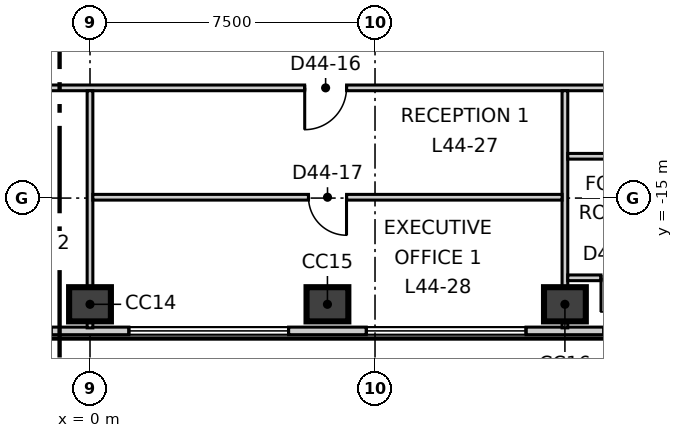
"""IFC4 building model, lengths in metres.
Left out: names, types, materials, properties, quantities, classifications, styles, units other than length and angle.
Written with IfcOpenShell. Run it as: python <this file> out.ifc"""

import sys

from ifc_helpers import new_model, si_unit, direction, frame, frame_2d, origin, origin_2d, place, context, subcontext, project, spatial, rectangle, extrude, element, fill, save


model = new_model("IFC4")
c1 = context("Model", 3, precision=1e-05, world=origin(), true_north=direction((0.0, 1.0)))
c2 = subcontext(c1, "Body", "Model", "MODEL_VIEW")
j1 = project(units=[si_unit("LENGTHUNIT", "METRE"), si_unit("PLANEANGLEUNIT", "RADIAN")], contexts=[c1])
p1 = place(None, origin())
s1 = spatial("IfcSite", under=j1, at=p1, CompositionType="ELEMENT")
p2 = place(p1, origin())
s2 = spatial("IfcBuilding", under=s1, at=p2, CompositionType="ELEMENT")
p3 = place(p2, frame((0.0, 0.0, 191.3)))
s3 = spatial("IfcBuildingStorey", under=s2, at=p3, CompositionType="ELEMENT", Elevation=191.3)
for number, where, z_axis, x_axis in (
    (1, (0.0, -17.795, -0.3), (0.0, 0.0, 1.0), (1.0, 0.0, 0.0)),
    (2, (6.248, -17.795, -0.3), (0.0, 0.0, 1.0), (1.0, 0.0, 0.0)),
    (3, (12.497, -17.795, -0.3), (0.0, 0.0, 1.0), (1.0, 0.0, 0.0)),
):
    element("IfcColumn", number, at=place(p3, frame(where, z_axis=z_axis, x_axis=x_axis)), inside=s3, PredefinedType="COLUMN", context=c2, shape_type="SweptSolid", body=[
        extrude(rectangle(XDim=1.1, YDim=0.9, at=origin_2d()), origin(), (0.0, 0.0, 1.0), 4.0),
    ])
p4 = place(p3, frame((-26.296, -18.495, 0.0), z_axis=(0.0, 0.0, 1.0), x_axis=(1.0, 0.0, 0.0)))
e4 = element("IfcWall", 4, at=p4, inside=s3, PredefinedType="ELEMENTEDWALL", context=c2, shape_type="SweptSolid", body=[
    extrude(rectangle(XDim=52.572, YDim=0.2, at=frame_2d((26.286, 0.0))), origin(), (0.0, 0.0, 1.0), 3.7),
])
p5 = place(p4, frame((2.327, 0.0, 0.9)))
e5 = element("IfcOpeningElement", 5, at=p5, cuts=e4, PredefinedType="OPENING", context=c2, shape_type="SweptSolid", body=[
    extrude(rectangle(XDim=4.2, YDim=2.5, at=frame_2d((2.1, 1.25))), frame((0.0, 0.11, 0.0), z_axis=(0.0, -1.0, 0.0), x_axis=(1.0, 0.0, 0.0)), (0.0, 0.0, 1.0), 0.22),
])
p6 = place(p4, frame((8.575, 0.0, 0.9)))
e6 = element("IfcOpeningElement", 6, at=p6, cuts=e4, PredefinedType="OPENING", context=c2, shape_type="SweptSolid", body=[
    extrude(rectangle(XDim=4.2, YDim=2.5, at=frame_2d((2.1, 1.25))), frame((0.0, 0.11, 0.0), z_axis=(0.0, -1.0, 0.0), x_axis=(1.0, 0.0, 0.0)), (0.0, 0.0, 1.0), 0.22),
])
p7 = place(p4, frame((14.824, 0.0, 0.9)))
e7 = element("IfcOpeningElement", 7, at=p7, cuts=e4, PredefinedType="OPENING", context=c2, shape_type="SweptSolid", body=[
    extrude(rectangle(XDim=4.2, YDim=2.5, at=frame_2d((2.1, 1.25))), frame((0.0, 0.11, 0.0), z_axis=(0.0, -1.0, 0.0), x_axis=(1.0, 0.0, 0.0)), (0.0, 0.0, 1.0), 0.22),
])
p8 = place(p4, frame((21.072, 0.0, 0.9)))
e8 = element("IfcOpeningElement", 8, at=p8, cuts=e4, PredefinedType="OPENING", context=c2, shape_type="SweptSolid", body=[
    extrude(rectangle(XDim=4.2, YDim=2.5, at=frame_2d((2.1, 1.25))), frame((0.0, 0.11, 0.0), z_axis=(0.0, -1.0, 0.0), x_axis=(1.0, 0.0, 0.0)), (0.0, 0.0, 1.0), 0.22),
])
p9 = place(p4, frame((27.32, 0.0, 0.9)))
e9 = element("IfcOpeningElement", 9, at=p9, cuts=e4, PredefinedType="OPENING", context=c2, shape_type="SweptSolid", body=[
    extrude(rectangle(XDim=4.2, YDim=2.5, at=frame_2d((2.1, 1.25))), frame((0.0, 0.11, 0.0), z_axis=(0.0, -1.0, 0.0), x_axis=(1.0, 0.0, 0.0)), (0.0, 0.0, 1.0), 0.22),
])
p10 = place(p4, frame((33.568, 0.0, 0.9)))
e10 = element("IfcOpeningElement", 10, at=p10, cuts=e4, PredefinedType="OPENING", context=c2, shape_type="SweptSolid", body=[
    extrude(rectangle(XDim=4.2, YDim=2.5, at=frame_2d((2.1, 1.25))), frame((0.0, 0.11, 0.0), z_axis=(0.0, -1.0, 0.0), x_axis=(1.0, 0.0, 0.0)), (0.0, 0.0, 1.0), 0.22),
])
p11 = place(p4, frame((39.817, 0.0, 0.9)))
e11 = element("IfcOpeningElement", 11, at=p11, cuts=e4, PredefinedType="OPENING", context=c2, shape_type="SweptSolid", body=[
    extrude(rectangle(XDim=4.2, YDim=2.5, at=frame_2d((2.1, 1.25))), frame((0.0, 0.11, 0.0), z_axis=(0.0, -1.0, 0.0), x_axis=(1.0, 0.0, 0.0)), (0.0, 0.0, 1.0), 0.22),
])
p12 = place(p4, frame((46.065, 0.0, 0.9)))
e12 = element("IfcOpeningElement", 12, at=p12, cuts=e4, PredefinedType="OPENING", context=c2, shape_type="SweptSolid", body=[
    extrude(rectangle(XDim=4.2, YDim=2.5, at=frame_2d((2.1, 1.25))), frame((0.0, 0.11, 0.0), z_axis=(0.0, -1.0, 0.0), x_axis=(1.0, 0.0, 0.0)), (0.0, 0.0, 1.0), 0.22),
])
p13 = place(p3, frame((29.165, -13.525, 0.0), z_axis=(0.0, 0.0, 1.0), x_axis=(-0.500008941164, 0.86602024154, 0.0)))
e13 = element("IfcWall", 13, at=p13, inside=s3, PredefinedType="ELEMENTEDWALL", context=c2, shape_type="SweptSolid", body=[
    extrude(rectangle(XDim=52.571, YDim=0.2, at=frame_2d((26.286, 0.0))), origin(), (0.0, 0.0, 1.0), 3.7),
])
p14 = place(p13, frame((2.327, 0.0, 0.9)))
e14 = element("IfcOpeningElement", 14, at=p14, cuts=e13, PredefinedType="OPENING", context=c2, shape_type="SweptSolid", body=[
    extrude(rectangle(XDim=4.2, YDim=2.5, at=frame_2d((2.1, 1.25))), frame((0.0, 0.11, 0.0), z_axis=(0.0, -1.0, 0.0), x_axis=(1.0, 0.0, 0.0)), (0.0, 0.0, 1.0), 0.22),
])
p15 = place(p13, frame((8.575, 0.0, 0.9)))
e15 = element("IfcOpeningElement", 15, at=p15, cuts=e13, PredefinedType="OPENING", context=c2, shape_type="SweptSolid", body=[
    extrude(rectangle(XDim=4.2, YDim=2.5, at=frame_2d((2.1, 1.25))), frame((0.0, 0.11, 0.0), z_axis=(0.0, -1.0, 0.0), x_axis=(1.0, 0.0, 0.0)), (0.0, 0.0, 1.0), 0.22),
])
p16 = place(p13, frame((14.823, 0.0, 0.9)))
e16 = element("IfcOpeningElement", 16, at=p16, cuts=e13, PredefinedType="OPENING", context=c2, shape_type="SweptSolid", body=[
    extrude(rectangle(XDim=4.2, YDim=2.5, at=frame_2d((2.1, 1.25))), frame((0.0, 0.11, 0.0), z_axis=(0.0, -1.0, 0.0), x_axis=(1.0, 0.0, 0.0)), (0.0, 0.0, 1.0), 0.22),
])
p17 = place(p13, frame((21.072, 0.0, 0.9)))
e17 = element("IfcOpeningElement", 17, at=p17, cuts=e13, PredefinedType="OPENING", context=c2, shape_type="SweptSolid", body=[
    extrude(rectangle(XDim=4.2, YDim=2.5, at=frame_2d((2.1, 1.25))), frame((0.0, 0.11, 0.0), z_axis=(0.0, -1.0, 0.0), x_axis=(1.0, 0.0, 0.0)), (0.0, 0.0, 1.0), 0.22),
])
p18 = place(p13, frame((27.32, 0.0, 0.9)))
e18 = element("IfcOpeningElement", 18, at=p18, cuts=e13, PredefinedType="OPENING", context=c2, shape_type="SweptSolid", body=[
    extrude(rectangle(XDim=4.2, YDim=2.5, at=frame_2d((2.1, 1.25))), frame((0.0, 0.11, 0.0), z_axis=(0.0, -1.0, 0.0), x_axis=(1.0, 0.0, 0.0)), (0.0, 0.0, 1.0), 0.22),
])
p19 = place(p13, frame((33.568, 0.0, 0.9)))
e19 = element("IfcOpeningElement", 19, at=p19, cuts=e13, PredefinedType="OPENING", context=c2, shape_type="SweptSolid", body=[
    extrude(rectangle(XDim=4.2, YDim=2.5, at=frame_2d((2.1, 1.25))), frame((0.0, 0.11, 0.0), z_axis=(0.0, -1.0, 0.0), x_axis=(1.0, 0.0, 0.0)), (0.0, 0.0, 1.0), 0.22),
])
p20 = place(p13, frame((39.816, 0.0, 0.9)))
e20 = element("IfcOpeningElement", 20, at=p20, cuts=e13, PredefinedType="OPENING", context=c2, shape_type="SweptSolid", body=[
    extrude(rectangle(XDim=4.2, YDim=2.5, at=frame_2d((2.1, 1.25))), frame((0.0, 0.11, 0.0), z_axis=(0.0, -1.0, 0.0), x_axis=(1.0, 0.0, 0.0)), (0.0, 0.0, 1.0), 0.22),
])
p21 = place(p13, frame((46.064, 0.0, 0.9)))
e21 = element("IfcOpeningElement", 21, at=p21, cuts=e13, PredefinedType="OPENING", context=c2, shape_type="SweptSolid", body=[
    extrude(rectangle(XDim=4.2, YDim=2.5, at=frame_2d((2.1, 1.25))), frame((0.0, 0.11, 0.0), z_axis=(0.0, -1.0, 0.0), x_axis=(1.0, 0.0, 0.0)), (0.0, 0.0, 1.0), 0.22),
])
p22 = place(p3, frame((-20.882, -11.969, 0.0), z_axis=(0.0, 0.0, 1.0), x_axis=(0.499998738735, 0.866026131975, 0.0)))
e22 = element("IfcWall", 22, at=p22, inside=s3, PredefinedType="PARTITIONING", context=c2, shape_type="SweptSolid", body=[
    extrude(rectangle(XDim=41.764, YDim=0.15, at=frame_2d((20.882, 0.0))), origin(), (0.0, 0.0, 1.0), 3.7),
])
p23 = place(p22, frame((37.014, 0.0, 0.0)))
e23 = element("IfcOpeningElement", 23, at=p23, cuts=e22, PredefinedType="OPENING", context=c2, shape_type="SweptSolid", body=[
    extrude(rectangle(XDim=1.0, YDim=2.1, at=frame_2d((0.5, 1.05))), frame((0.0, 0.085, 0.0), z_axis=(0.0, -1.0, 0.0), x_axis=(1.0, 0.0, 0.0)), (0.0, 0.0, 1.0), 0.17),
])
p24 = place(p22, frame((29.653, 0.0, 0.0)))
e24 = element("IfcOpeningElement", 24, at=p24, cuts=e22, PredefinedType="OPENING", context=c2, shape_type="SweptSolid", body=[
    extrude(rectangle(XDim=1.0, YDim=2.1, at=frame_2d((0.5, 1.05))), frame((0.0, 0.085, 0.0), z_axis=(0.0, -1.0, 0.0), x_axis=(1.0, 0.0, 0.0)), (0.0, 0.0, 1.0), 0.17),
])
p25 = place(p22, frame((23.405, 0.0, 0.0)))
e25 = element("IfcOpeningElement", 25, at=p25, cuts=e22, PredefinedType="OPENING", context=c2, shape_type="SweptSolid", body=[
    extrude(rectangle(XDim=1.0, YDim=2.1, at=frame_2d((0.5, 1.05))), frame((0.0, 0.085, 0.0), z_axis=(0.0, -1.0, 0.0), x_axis=(1.0, 0.0, 0.0)), (0.0, 0.0, 1.0), 0.17),
])
p26 = place(p22, frame((9.657, 0.0, 0.0)))
e26 = element("IfcOpeningElement", 26, at=p26, cuts=e22, PredefinedType="OPENING", context=c2, shape_type="SweptSolid", body=[
    extrude(rectangle(XDim=1.1, YDim=2.1, at=frame_2d((0.55, 1.05))), frame((0.0, 0.085, 0.0), z_axis=(0.0, -1.0, 0.0), x_axis=(1.0, 0.0, 0.0)), (0.0, 0.0, 1.0), 0.17),
])
p27 = place(p22, frame((18.757, 0.0, 0.0)))
e27 = element("IfcOpeningElement", 27, at=p27, cuts=e22, PredefinedType="OPENING", context=c2, shape_type="SweptSolid", body=[
    extrude(rectangle(XDim=0.9, YDim=2.1, at=frame_2d((0.45, 1.05))), frame((0.0, 0.085, 0.0), z_axis=(0.0, -1.0, 0.0), x_axis=(1.0, 0.0, 0.0)), (0.0, 0.0, 1.0), 0.17),
])
p28 = place(p22, frame((15.557, 0.0, 0.0)))
e28 = element("IfcOpeningElement", 28, at=p28, cuts=e22, PredefinedType="OPENING", context=c2, shape_type="SweptSolid", body=[
    extrude(rectangle(XDim=0.9, YDim=2.1, at=frame_2d((0.45, 1.05))), frame((0.0, 0.085, 0.0), z_axis=(0.0, -1.0, 0.0), x_axis=(1.0, 0.0, 0.0)), (0.0, 0.0, 1.0), 0.17),
])
p29 = place(p22, frame((12.657, 0.0, 0.0)))
e29 = element("IfcOpeningElement", 29, at=p29, cuts=e22, PredefinedType="OPENING", context=c2, shape_type="SweptSolid", body=[
    extrude(rectangle(XDim=1.0, YDim=2.1, at=frame_2d((0.5, 1.05))), frame((0.0, 0.085, 0.0), z_axis=(0.0, -1.0, 0.0), x_axis=(1.0, 0.0, 0.0)), (0.0, 0.0, 1.0), 0.17),
])
p30 = place(p22, frame((3.56, 0.0, 0.0)))
e30 = element("IfcOpeningElement", 30, at=p30, cuts=e22, PredefinedType="OPENING", context=c2, shape_type="SweptSolid", body=[
    extrude(rectangle(XDim=1.1, YDim=2.1, at=frame_2d((0.55, 1.05))), frame((0.0, 0.085, 0.0), z_axis=(0.0, -1.0, 0.0), x_axis=(1.0, 0.0, 0.0)), (0.0, 0.0, 1.0), 0.17),
])
p31 = place(p3, frame((-20.808, -12.1, 0.0), z_axis=(0.0, 0.0, 1.0), x_axis=(1.0, 0.0, 0.0)))
e31 = element("IfcWall", 31, at=p31, inside=s3, PredefinedType="PARTITIONING", context=c2, shape_type="SweptSolid", body=[
    extrude(rectangle(XDim=41.766, YDim=0.15, at=frame_2d((20.883, 0.0))), origin(), (0.0, 0.0, 1.0), 3.7),
])
p32 = place(p31, frame((3.5, 0.0, 0.0)))
e32 = element("IfcOpeningElement", 32, at=p32, cuts=e31, PredefinedType="OPENING", context=c2, shape_type="SweptSolid", body=[
    extrude(rectangle(XDim=1.1, YDim=2.1, at=frame_2d((0.55, 1.05))), frame((0.0, 0.085, 0.0), z_axis=(0.0, -1.0, 0.0), x_axis=(1.0, 0.0, 0.0)), (0.0, 0.0, 1.0), 0.17),
])
p33 = place(p31, frame((18.362, 0.0, 0.0)))
e33 = element("IfcOpeningElement", 33, at=p33, cuts=e31, PredefinedType="OPENING", context=c2, shape_type="SweptSolid", body=[
    extrude(rectangle(XDim=1.1, YDim=2.1, at=frame_2d((0.55, 1.05))), frame((0.0, 0.085, 0.0), z_axis=(0.0, -1.0, 0.0), x_axis=(1.0, 0.0, 0.0)), (0.0, 0.0, 1.0), 0.17),
])
p34 = place(p31, frame((9.462, 0.0, 0.0)))
e34 = element("IfcOpeningElement", 34, at=p34, cuts=e31, PredefinedType="OPENING", context=c2, shape_type="SweptSolid", body=[
    extrude(rectangle(XDim=0.9, YDim=2.1, at=frame_2d((0.45, 1.05))), frame((0.0, 0.085, 0.0), z_axis=(0.0, -1.0, 0.0), x_axis=(1.0, 0.0, 0.0)), (0.0, 0.0, 1.0), 0.17),
])
p35 = place(p31, frame((12.662, 0.0, 0.0)))
e35 = element("IfcOpeningElement", 35, at=p35, cuts=e31, PredefinedType="OPENING", context=c2, shape_type="SweptSolid", body=[
    extrude(rectangle(XDim=0.9, YDim=2.1, at=frame_2d((0.45, 1.05))), frame((0.0, 0.085, 0.0), z_axis=(0.0, -1.0, 0.0), x_axis=(1.0, 0.0, 0.0)), (0.0, 0.0, 1.0), 0.17),
])
p36 = place(p31, frame((15.362, 0.0, 0.0)))
e36 = element("IfcOpeningElement", 36, at=p36, cuts=e31, PredefinedType="OPENING", context=c2, shape_type="SweptSolid", body=[
    extrude(rectangle(XDim=1.0, YDim=2.1, at=frame_2d((0.5, 1.05))), frame((0.0, 0.085, 0.0), z_axis=(0.0, -1.0, 0.0), x_axis=(1.0, 0.0, 0.0)), (0.0, 0.0, 1.0), 0.17),
])
p37 = place(p31, frame((26.458, 0.0, 0.0)))
e37 = element("IfcOpeningElement", 37, at=p37, cuts=e31, PredefinedType="OPENING", context=c2, shape_type="SweptSolid", body=[
    extrude(rectangle(XDim=1.1, YDim=2.1, at=frame_2d((0.55, 1.05))), frame((0.0, 0.085, 0.0), z_axis=(0.0, -1.0, 0.0), x_axis=(1.0, 0.0, 0.0)), (0.0, 0.0, 1.0), 0.17),
])
p38 = place(p31, frame((36.955, 0.0, 0.0)))
e38 = element("IfcOpeningElement", 38, at=p38, cuts=e31, PredefinedType="OPENING", context=c2, shape_type="SweptSolid", body=[
    extrude(rectangle(XDim=1.1, YDim=2.1, at=frame_2d((0.55, 1.05))), frame((0.0, 0.085, 0.0), z_axis=(0.0, -1.0, 0.0), x_axis=(1.0, 0.0, 0.0)), (0.0, 0.0, 1.0), 0.17),
])
p39 = place(p3, frame((0.0, -18.415, 0.0), z_axis=(0.0, 0.0, 1.0), x_axis=(0.0, 1.0, 0.0)))
e39 = element("IfcWall", 39, at=p39, inside=s3, PredefinedType="PARTITIONING", context=c2, shape_type="SweptSolid", body=[
    extrude(rectangle(XDim=6.24, YDim=0.15, at=frame_2d((3.12, 0.0))), origin(), (0.0, 0.0, 1.0), 3.2),
])
p40 = place(p3, frame((0.075, 24.07, 0.0), z_axis=(0.0, 0.0, 1.0), x_axis=(0.49999939571, -0.866025752671, 0.0)))
e40 = element("IfcWall", 40, at=p40, inside=s3, PredefinedType="PARTITIONING", context=c2, shape_type="SweptSolid", body=[
    extrude(rectangle(XDim=41.614, YDim=0.15, at=frame_2d((20.807, 0.0))), origin(), (0.0, 0.0, 1.0), 3.7),
])
p41 = place(p40, frame((37.015, 0.0, 0.0)))
e41 = element("IfcOpeningElement", 41, at=p41, cuts=e40, PredefinedType="OPENING", context=c2, shape_type="SweptSolid", body=[
    extrude(rectangle(XDim=1.1, YDim=2.1, at=frame_2d((0.55, 1.05))), frame((0.0, 0.085, 0.0), z_axis=(0.0, -1.0, 0.0), x_axis=(1.0, 0.0, 0.0)), (0.0, 0.0, 1.0), 0.17),
])
p42 = place(p40, frame((25.154, 0.0, 0.0)))
e42 = element("IfcOpeningElement", 42, at=p42, cuts=e40, PredefinedType="OPENING", context=c2, shape_type="SweptSolid", body=[
    extrude(rectangle(XDim=1.0, YDim=2.1, at=frame_2d((0.5, 1.05))), frame((0.0, 0.085, 0.0), z_axis=(0.0, -1.0, 0.0), x_axis=(1.0, 0.0, 0.0)), (0.0, 0.0, 1.0), 0.17),
])
p43 = place(p40, frame((31.454, 0.0, 0.0)))
e43 = element("IfcOpeningElement", 43, at=p43, cuts=e40, PredefinedType="OPENING", context=c2, shape_type="SweptSolid", body=[
    extrude(rectangle(XDim=0.9, YDim=2.1, at=frame_2d((0.45, 1.05))), frame((0.0, 0.085, 0.0), z_axis=(0.0, -1.0, 0.0), x_axis=(1.0, 0.0, 0.0)), (0.0, 0.0, 1.0), 0.17),
])
p44 = place(p40, frame((17.157, 0.0, 0.0)))
e44 = element("IfcOpeningElement", 44, at=p44, cuts=e40, PredefinedType="OPENING", context=c2, shape_type="SweptSolid", body=[
    extrude(rectangle(XDim=1.0, YDim=2.1, at=frame_2d((0.5, 1.05))), frame((0.0, 0.085, 0.0), z_axis=(0.0, -1.0, 0.0), x_axis=(1.0, 0.0, 0.0)), (0.0, 0.0, 1.0), 0.17),
])
p45 = place(p40, frame((6.609, 0.0, 0.0)))
e45 = element("IfcOpeningElement", 45, at=p45, cuts=e40, PredefinedType="OPENING", context=c2, shape_type="SweptSolid", body=[
    extrude(rectangle(XDim=1.1, YDim=2.1, at=frame_2d((0.55, 1.05))), frame((0.0, 0.085, 0.0), z_axis=(0.0, -1.0, 0.0), x_axis=(1.0, 0.0, 0.0)), (0.0, 0.0, 1.0), 0.17),
])
p46 = place(p3, frame((12.497, -18.415, 0.0), z_axis=(0.0, 0.0, 1.0), x_axis=(0.0, 1.0, 0.0)))
e46 = element("IfcWall", 46, at=p46, inside=s3, PredefinedType="PARTITIONING", context=c2, shape_type="SweptSolid", body=[
    extrude(rectangle(XDim=6.24, YDim=0.15, at=frame_2d((3.12, 0.0))), origin(), (0.0, 0.0, 1.0), 3.7),
])
p47 = place(p3, frame((0.075, -14.978, 0.0), z_axis=(0.0, 0.0, 1.0), x_axis=(1.0, 0.0, 0.0)))
e47 = element("IfcWall", 47, at=p47, inside=s3, PredefinedType="PARTITIONING", context=c2, shape_type="SweptSolid", body=[
    extrude(rectangle(XDim=12.347, YDim=0.15, at=frame_2d((6.174, 0.0))), origin(), (0.0, 0.0, 1.0), 3.7),
])
p48 = place(p47, frame((5.675, 0.0, 0.0)))
e48 = element("IfcOpeningElement", 48, at=p48, cuts=e47, PredefinedType="OPENING", context=c2, shape_type="SweptSolid", body=[
    extrude(rectangle(XDim=1.0, YDim=2.1, at=frame_2d((0.5, 1.05))), frame((0.0, 0.085, 0.0), z_axis=(0.0, -1.0, 0.0), x_axis=(1.0, 0.0, 0.0)), (0.0, 0.0, 1.0), 0.17),
])
p49 = place(p3, frame((12.572, -17.098, 0.0), z_axis=(0.0, 0.0, 1.0), x_axis=(1.0, 0.0, 0.0)))
e49 = element("IfcWall", 49, at=p49, inside=s3, PredefinedType="PARTITIONING", context=c2, shape_type="SweptSolid", body=[
    extrude(rectangle(XDim=5.525, YDim=0.15, at=frame_2d((2.762, 0.0))), origin(), (0.0, 0.0, 1.0), 3.7),
])
p50 = place(p49, frame((0.875, 0.0, 0.0)))
e50 = element("IfcOpeningElement", 50, at=p50, cuts=e49, PredefinedType="OPENING", context=c2, shape_type="SweptSolid", body=[
    extrude(rectangle(XDim=0.9, YDim=2.1, at=frame_2d((0.45, 1.05))), frame((0.0, 0.085, 0.0), z_axis=(0.0, -1.0, 0.0), x_axis=(1.0, 0.0, 0.0)), (0.0, 0.0, 1.0), 0.17),
])
p51 = place(p3, frame((12.572, -13.9, 0.0), z_axis=(0.0, 0.0, 1.0), x_axis=(1.0, 0.0, 0.0)))
e51 = element("IfcWall", 51, at=p51, inside=s3, PredefinedType="PARTITIONING", context=c2, shape_type="SweptSolid", body=[
    extrude(rectangle(XDim=5.525, YDim=0.15, at=frame_2d((2.762, 0.0))), origin(), (0.0, 0.0, 1.0), 3.7),
])
p52 = place(p9, origin())
e52 = element("IfcWindow", 52, at=p52, inside=s3, PartitioningType="SINGLE_PANEL", PredefinedType="WINDOW", context=c2, shape_type="SweptSolid", body=[
    extrude(rectangle(XDim=4.2, YDim=2.5, at=frame_2d((2.1, 1.25))), frame((0.0, 0.03, 0.0), z_axis=(0.0, -1.0, 0.0), x_axis=(1.0, 0.0, 0.0)), (0.0, 0.0, 1.0), 0.06),
])
fill(e9, e52)
p53 = place(p10, origin())
e53 = element("IfcWindow", 53, at=p53, inside=s3, PartitioningType="SINGLE_PANEL", PredefinedType="WINDOW", context=c2, shape_type="SweptSolid", body=[
    extrude(rectangle(XDim=4.2, YDim=2.5, at=frame_2d((2.1, 1.25))), frame((0.0, 0.03, 0.0), z_axis=(0.0, -1.0, 0.0), x_axis=(1.0, 0.0, 0.0)), (0.0, 0.0, 1.0), 0.06),
])
fill(e10, e53)
p54 = place(p37, origin())
e54 = element("IfcDoor", 54, at=p54, inside=s3, OperationType="SINGLE_SWING_LEFT", PredefinedType="DOOR", context=c2, shape_type="SweptSolid", body=[
    extrude(rectangle(XDim=1.1, YDim=2.1, at=frame_2d((0.55, 1.05))), frame((0.0, 0.025, 0.0), z_axis=(0.0, -1.0, 0.0), x_axis=(1.0, 0.0, 0.0)), (0.0, 0.0, 1.0), 0.05),
])
fill(e37, e54)
p55 = place(p48, origin())
e55 = element("IfcDoor", 55, at=p55, inside=s3, OperationType="SINGLE_SWING_RIGHT", PredefinedType="DOOR", context=c2, shape_type="SweptSolid", body=[
    extrude(rectangle(XDim=1.0, YDim=2.1, at=frame_2d((0.5, 1.05))), frame((0.0, 0.025, 0.0), z_axis=(0.0, -1.0, 0.0), x_axis=(1.0, 0.0, 0.0)), (0.0, 0.0, 1.0), 0.05),
])
fill(e48, e55)
p56 = place(p50, origin())
e56 = element("IfcDoor", 56, at=p56, inside=s3, OperationType="SINGLE_SWING_LEFT", PredefinedType="DOOR", context=c2, shape_type="SweptSolid", body=[
    extrude(rectangle(XDim=0.9, YDim=2.1, at=frame_2d((0.45, 1.05))), frame((0.0, 0.025, 0.0), z_axis=(0.0, -1.0, 0.0), x_axis=(1.0, 0.0, 0.0)), (0.0, 0.0, 1.0), 0.05),
])
fill(e50, e56)
save(model, sys.argv[1])
